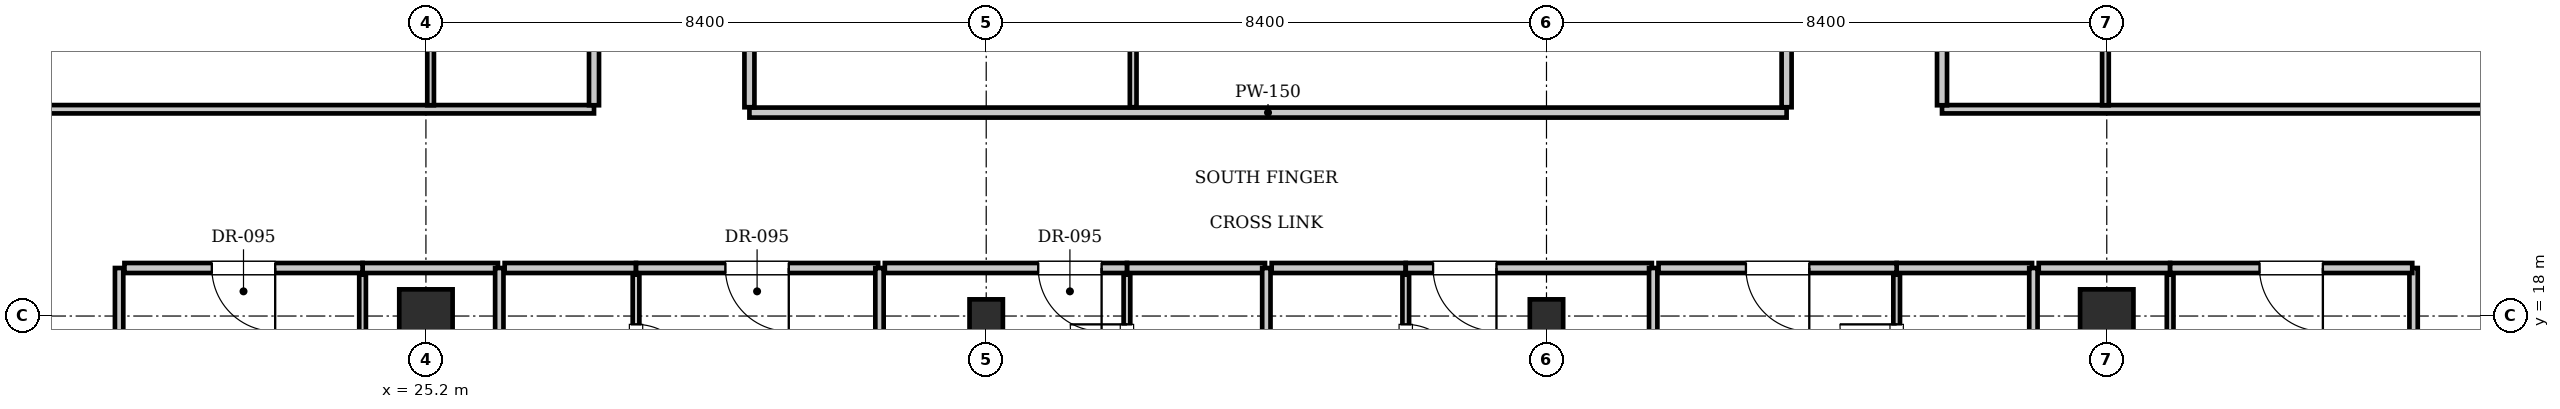
"""IFC4 building model, lengths in metres.
Left out: names, types, materials, properties, quantities, classifications, styles, units other than length and angle.
Written with IfcOpenShell. Run it as: python <this file> out.ifc"""

import sys

from ifc_helpers import new_model, si_unit, direction, frame, frame_2d, origin, origin_2d, place, context, subcontext, project, spatial, rectangle, i_section, extrude, element, fill, save


model = new_model("IFC4")
c1 = context("Model", 3, precision=1e-05, world=origin(), true_north=direction((0.0, 1.0)))
c2 = subcontext(c1, "Body", "Model", "MODEL_VIEW")
j1 = project(units=[si_unit("LENGTHUNIT", "METRE"), si_unit("PLANEANGLEUNIT", "RADIAN")], contexts=[c1])
p1 = place(None, origin())
s1 = spatial("IfcSite", under=j1, at=p1, CompositionType="ELEMENT")
p2 = place(p1, origin())
s2 = spatial("IfcBuilding", under=s1, at=p2, CompositionType="ELEMENT")
p3 = place(p2, frame((0.0, 0.0, 243.25)))
s3 = spatial("IfcBuildingStorey", under=s2, at=p3, CompositionType="ELEMENT", Elevation=243.25)
for number, where, z_axis, x_axis in (
    (1, (25.2, 18.0, 0.0), (0.0, 0.0, 1.0), (1.0, 0.0, 0.0)),
    (2, (50.4, 18.0, 0.0), (0.0, 0.0, 1.0), (1.0, 0.0, 0.0)),
):
    element("IfcColumn", number, at=place(p3, frame(where, z_axis=z_axis, x_axis=x_axis)), inside=s3, PredefinedType="COLUMN", context=c2, shape_type="SweptSolid", body=[
        extrude(rectangle(XDim=0.8, YDim=0.8, at=origin_2d()), origin(), (0.0, 0.0, 1.0), 3.85),
    ])
for number, where, z_axis, x_axis in (
    (3, (33.6, 18.0, 0.0), (0.0, 0.0, 1.0), (1.0, 0.0, 0.0)),
    (4, (42.0, 18.0, 0.0), (0.0, 0.0, 1.0), (1.0, 0.0, 0.0)),
):
    element("IfcColumn", number, at=place(p3, frame(where, z_axis=z_axis, x_axis=x_axis)), inside=s3, PredefinedType="COLUMN", context=c2, shape_type="SweptSolid", body=[
        extrude(i_section(OverallWidth=0.5, OverallDepth=0.5, WebThickness=0.022, FlangeThickness=0.032, at=origin_2d()), origin(), (0.0, 0.0, 1.0), 3.85),
    ])
p4 = place(p3, frame((30.05, 21.05, 0.0), z_axis=(0.0, 0.0, 1.0), x_axis=(1.0, 0.0, 0.0)))
e5 = element("IfcWall", 5, at=p4, inside=s3, PredefinedType="PARTITIONING", context=c2, shape_type="SweptSolid", body=[
    extrude(rectangle(XDim=15.55, YDim=0.15, at=frame_2d((7.775, 0.0))), origin(), (0.0, 0.0, 1.0), 3.61),
])
for number, where, z_axis, x_axis in (
    (6, (30.05, 21.13, 0.0), (0.0, 0.0, 1.0), (0.0, 1.0, 0.0)),
    (7, (45.6, 21.13, 0.0), (0.0, 0.0, 1.0), (0.0, 1.0, 0.0)),
):
    element("IfcWall", number, at=place(p3, frame(where, z_axis=z_axis, x_axis=x_axis)), inside=s3, PredefinedType="PARTITIONING", context=c2, shape_type="SweptSolid", body=[
        extrude(rectangle(XDim=9.49, YDim=0.15, at=frame_2d((4.745, 0.0))), origin(), (0.0, 0.0, 1.0), 3.61),
    ])
p5 = place(p3, frame((35.803, 21.13, 0.0), z_axis=(0.0, 0.0, 1.0), x_axis=(0.0, 1.0, 0.0)))
e8 = element("IfcWall", 8, at=p5, inside=s3, PredefinedType="PARTITIONING", context=c2, shape_type="SweptSolid", body=[
    extrude(rectangle(XDim=9.49, YDim=0.1, at=frame_2d((4.745, 0.0))), origin(), (0.0, 0.0, 1.0), 3.61),
])
for number, where, z_axis, x_axis in (
    (9, (20.6, 14.4, 0.0), (0.0, 0.0, 1.0), (0.0, 1.0, 0.0)),
    (10, (55.0, 14.4, 0.0), (0.0, 0.0, 1.0), (0.0, 1.0, 0.0)),
):
    element("IfcWall", number, at=place(p3, frame(where, z_axis=z_axis, x_axis=x_axis)), inside=s3, PredefinedType="PARTITIONING", context=c2, shape_type="SweptSolid", body=[
        extrude(rectangle(XDim=4.32, YDim=0.125, at=frame_2d((2.16, 0.0))), origin(), (0.0, 0.0, 1.0), 3.61),
    ])
p6 = place(p3, frame((24.25, 18.72, 0.0), z_axis=(0.0, 0.0, 1.0), x_axis=(1.0, 0.0, 0.0)))
e11 = element("IfcWall", 11, at=p6, inside=s3, PredefinedType="PARTITIONING", context=c2, shape_type="SweptSolid", body=[
    extrude(rectangle(XDim=2.03, YDim=0.15, at=frame_2d((1.015, 0.0))), origin(), (0.0, 0.0, 1.0), 3.61),
])
p7 = place(p3, frame((24.25, 16.28, 0.0), z_axis=(0.0, 0.0, 1.0), x_axis=(0.0, 1.0, 0.0)))
e12 = element("IfcWall", 12, at=p7, inside=s3, PredefinedType="PARTITIONING", context=c2, shape_type="SweptSolid", body=[
    extrude(rectangle(XDim=2.34, YDim=0.1, at=frame_2d((1.17, 0.0))), origin(), (0.0, 0.0, 1.0), 3.61),
])
p8 = place(p7, frame((0.265, 0.0, 0.0)))
e13 = element("IfcOpeningElement", 13, at=p8, cuts=e12, PredefinedType="OPENING", context=c2, shape_type="SweptSolid", body=[
    extrude(rectangle(XDim=0.85, YDim=2.1, at=frame_2d((0.425, 1.05))), frame((0.0, 0.06, 0.0), z_axis=(0.0, -1.0, 0.0), x_axis=(1.0, 0.0, 0.0)), (0.0, 0.0, 1.0), 0.12),
])
p9 = place(p3, frame((20.68, 18.72, 0.0), z_axis=(0.0, 0.0, 1.0), x_axis=(1.0, 0.0, 0.0)))
e14 = element("IfcWall", 14, at=p9, inside=s3, PredefinedType="PARTITIONING", context=c2, shape_type="SweptSolid", body=[
    extrude(rectangle(XDim=3.57, YDim=0.15, at=frame_2d((1.785, 0.0))), origin(), (0.0, 0.0, 1.0), 3.61),
])
p10 = place(p9, frame((1.31, 0.0, 0.0)))
e15 = element("IfcOpeningElement", 15, at=p10, cuts=e14, PredefinedType="OPENING", context=c2, shape_type="SweptSolid", body=[
    extrude(rectangle(XDim=0.95, YDim=2.15, at=frame_2d((0.475, 1.075))), frame((0.0, 0.085, 0.0), z_axis=(0.0, -1.0, 0.0), x_axis=(1.0, 0.0, 0.0)), (0.0, 0.0, 1.0), 0.17),
])
p11 = place(p3, frame((26.3, 9.3, 0.0), z_axis=(0.0, 0.0, 1.0), x_axis=(0.0, 1.0, 0.0)))
e16 = element("IfcWall", 16, at=p11, inside=s3, PredefinedType="PARTITIONING", context=c2, shape_type="SweptSolid", body=[
    extrude(rectangle(XDim=9.42, YDim=0.125, at=frame_2d((4.71, 0.0))), origin(), (0.0, 0.0, 1.0), 3.61),
])
p12 = place(p3, frame((26.38, 18.72, 0.0), z_axis=(0.0, 0.0, 1.0), x_axis=(1.0, 0.0, 0.0)))
e17 = element("IfcWall", 17, at=p12, inside=s3, PredefinedType="PARTITIONING", context=c2, shape_type="SweptSolid", body=[
    extrude(rectangle(XDim=1.97, YDim=0.15, at=frame_2d((0.985, 0.0))), origin(), (0.0, 0.0, 1.0), 3.61),
])
p13 = place(p3, frame((28.35, 16.28, 0.0), z_axis=(0.0, 0.0, 1.0), x_axis=(0.0, 1.0, 0.0)))
e18 = element("IfcWall", 18, at=p13, inside=s3, PredefinedType="PARTITIONING", context=c2, shape_type="SweptSolid", body=[
    extrude(rectangle(XDim=2.34, YDim=0.1, at=frame_2d((1.17, 0.0))), origin(), (0.0, 0.0, 1.0), 3.61),
])
p14 = place(p13, frame((0.745, 0.0, 0.0)))
e19 = element("IfcOpeningElement", 19, at=p14, cuts=e18, PredefinedType="OPENING", context=c2, shape_type="SweptSolid", body=[
    extrude(rectangle(XDim=0.85, YDim=2.1, at=frame_2d((0.425, 1.05))), frame((0.0, 0.06, 0.0), z_axis=(0.0, -1.0, 0.0), x_axis=(1.0, 0.0, 0.0)), (0.0, 0.0, 1.0), 0.12),
])
p15 = place(p3, frame((28.35, 18.72, 0.0), z_axis=(0.0, 0.0, 1.0), x_axis=(1.0, 0.0, 0.0)))
e20 = element("IfcWall", 20, at=p15, inside=s3, PredefinedType="PARTITIONING", context=c2, shape_type="SweptSolid", body=[
    extrude(rectangle(XDim=3.63, YDim=0.15, at=frame_2d((1.815, 0.0))), origin(), (0.0, 0.0, 1.0), 3.61),
])
p16 = place(p15, frame((1.34, 0.0, 0.0)))
e21 = element("IfcOpeningElement", 21, at=p16, cuts=e20, PredefinedType="OPENING", context=c2, shape_type="SweptSolid", body=[
    extrude(rectangle(XDim=0.95, YDim=2.15, at=frame_2d((0.475, 1.075))), frame((0.0, 0.085, 0.0), z_axis=(0.0, -1.0, 0.0), x_axis=(1.0, 0.0, 0.0)), (0.0, 0.0, 1.0), 0.17),
])
p17 = place(p3, frame((32.0, 9.3, 0.0), z_axis=(0.0, 0.0, 1.0), x_axis=(0.0, 1.0, 0.0)))
e22 = element("IfcWall", 22, at=p17, inside=s3, PredefinedType="PARTITIONING", context=c2, shape_type="SweptSolid", body=[
    extrude(rectangle(XDim=9.42, YDim=0.125, at=frame_2d((4.71, 0.0))), origin(), (0.0, 0.0, 1.0), 3.61),
])
p18 = place(p3, frame((35.71, 18.72, 0.0), z_axis=(0.0, 0.0, 1.0), x_axis=(1.0, 0.0, 0.0)))
e23 = element("IfcWall", 23, at=p18, inside=s3, PredefinedType="PARTITIONING", context=c2, shape_type="SweptSolid", body=[
    extrude(rectangle(XDim=2.07, YDim=0.15, at=frame_2d((1.035, 0.0))), origin(), (0.0, 0.0, 1.0), 3.61),
])
p19 = place(p3, frame((35.71, 16.28, 0.0), z_axis=(0.0, 0.0, 1.0), x_axis=(0.0, 1.0, 0.0)))
e24 = element("IfcWall", 24, at=p19, inside=s3, PredefinedType="PARTITIONING", context=c2, shape_type="SweptSolid", body=[
    extrude(rectangle(XDim=2.34, YDim=0.1, at=frame_2d((1.17, 0.0))), origin(), (0.0, 0.0, 1.0), 3.61),
])
p20 = place(p19, frame((0.745, 0.0, 0.0)))
e25 = element("IfcOpeningElement", 25, at=p20, cuts=e24, PredefinedType="OPENING", context=c2, shape_type="SweptSolid", body=[
    extrude(rectangle(XDim=0.85, YDim=2.1, at=frame_2d((0.425, 1.05))), frame((0.0, 0.06, 0.0), z_axis=(0.0, -1.0, 0.0), x_axis=(1.0, 0.0, 0.0)), (0.0, 0.0, 1.0), 0.12),
])
p21 = place(p3, frame((32.08, 18.72, 0.0), z_axis=(0.0, 0.0, 1.0), x_axis=(1.0, 0.0, 0.0)))
e26 = element("IfcWall", 26, at=p21, inside=s3, PredefinedType="PARTITIONING", context=c2, shape_type="SweptSolid", body=[
    extrude(rectangle(XDim=3.63, YDim=0.15, at=frame_2d((1.815, 0.0))), origin(), (0.0, 0.0, 1.0), 3.61),
])
p22 = place(p21, frame((2.3, 0.0, 0.0)))
e27 = element("IfcOpeningElement", 27, at=p22, cuts=e26, PredefinedType="OPENING", context=c2, shape_type="SweptSolid", body=[
    extrude(rectangle(XDim=0.95, YDim=2.15, at=frame_2d((0.475, 1.075))), frame((0.0, 0.085, 0.0), z_axis=(0.0, -1.0, 0.0), x_axis=(1.0, 0.0, 0.0)), (0.0, 0.0, 1.0), 0.17),
])
p23 = place(p3, frame((37.8, 9.3, 0.0), z_axis=(0.0, 0.0, 1.0), x_axis=(0.0, 1.0, 0.0)))
e28 = element("IfcWall", 28, at=p23, inside=s3, PredefinedType="PARTITIONING", context=c2, shape_type="SweptSolid", body=[
    extrude(rectangle(XDim=9.42, YDim=0.125, at=frame_2d((4.71, 0.0))), origin(), (0.0, 0.0, 1.0), 3.3),
])
p24 = place(p3, frame((37.88, 18.72, 0.0), z_axis=(0.0, 0.0, 1.0), x_axis=(1.0, 0.0, 0.0)))
e29 = element("IfcWall", 29, at=p24, inside=s3, PredefinedType="PARTITIONING", context=c2, shape_type="SweptSolid", body=[
    extrude(rectangle(XDim=2.01, YDim=0.15, at=frame_2d((1.005, 0.0))), origin(), (0.0, 0.0, 1.0), 3.61),
])
p25 = place(p3, frame((39.89, 16.28, 0.0), z_axis=(0.0, 0.0, 1.0), x_axis=(0.0, 1.0, 0.0)))
e30 = element("IfcWall", 30, at=p25, inside=s3, PredefinedType="PARTITIONING", context=c2, shape_type="SweptSolid", body=[
    extrude(rectangle(XDim=2.34, YDim=0.1, at=frame_2d((1.17, 0.0))), origin(), (0.0, 0.0, 1.0), 3.61),
])
p26 = place(p25, frame((0.745, 0.0, 0.0)))
e31 = element("IfcOpeningElement", 31, at=p26, cuts=e30, PredefinedType="OPENING", context=c2, shape_type="SweptSolid", body=[
    extrude(rectangle(XDim=0.85, YDim=2.1, at=frame_2d((0.425, 1.05))), frame((0.0, 0.06, 0.0), z_axis=(0.0, -1.0, 0.0), x_axis=(1.0, 0.0, 0.0)), (0.0, 0.0, 1.0), 0.12),
])
p27 = place(p3, frame((39.89, 18.72, 0.0), z_axis=(0.0, 0.0, 1.0), x_axis=(1.0, 0.0, 0.0)))
e32 = element("IfcWall", 32, at=p27, inside=s3, PredefinedType="PARTITIONING", context=c2, shape_type="SweptSolid", body=[
    extrude(rectangle(XDim=3.69, YDim=0.15, at=frame_2d((1.845, 0.0))), origin(), (0.0, 0.0, 1.0), 3.61),
])
p28 = place(p27, frame((0.41, 0.0, 0.0)))
e33 = element("IfcOpeningElement", 33, at=p28, cuts=e32, PredefinedType="OPENING", context=c2, shape_type="SweptSolid", body=[
    extrude(rectangle(XDim=0.95, YDim=2.15, at=frame_2d((0.475, 1.075))), frame((0.0, 0.085, 0.0), z_axis=(0.0, -1.0, 0.0), x_axis=(1.0, 0.0, 0.0)), (0.0, 0.0, 1.0), 0.17),
])
p29 = place(p3, frame((43.6, 9.3, 0.0), z_axis=(0.0, 0.0, 1.0), x_axis=(0.0, 1.0, 0.0)))
e34 = element("IfcWall", 34, at=p29, inside=s3, PredefinedType="PARTITIONING", context=c2, shape_type="SweptSolid", body=[
    extrude(rectangle(XDim=9.42, YDim=0.125, at=frame_2d((4.71, 0.0))), origin(), (0.0, 0.0, 1.0), 3.61),
])
p30 = place(p3, frame((47.25, 18.72, 0.0), z_axis=(0.0, 0.0, 1.0), x_axis=(1.0, 0.0, 0.0)))
e35 = element("IfcWall", 35, at=p30, inside=s3, PredefinedType="PARTITIONING", context=c2, shape_type="SweptSolid", body=[
    extrude(rectangle(XDim=2.03, YDim=0.15, at=frame_2d((1.015, 0.0))), origin(), (0.0, 0.0, 1.0), 3.61),
])
p31 = place(p3, frame((47.25, 16.28, 0.0), z_axis=(0.0, 0.0, 1.0), x_axis=(0.0, 1.0, 0.0)))
e36 = element("IfcWall", 36, at=p31, inside=s3, PredefinedType="PARTITIONING", context=c2, shape_type="SweptSolid", body=[
    extrude(rectangle(XDim=2.34, YDim=0.1, at=frame_2d((1.17, 0.0))), origin(), (0.0, 0.0, 1.0), 3.61),
])
p32 = place(p31, frame((0.745, 0.0, 0.0)))
e37 = element("IfcOpeningElement", 37, at=p32, cuts=e36, PredefinedType="OPENING", context=c2, shape_type="SweptSolid", body=[
    extrude(rectangle(XDim=0.85, YDim=2.1, at=frame_2d((0.425, 1.05))), frame((0.0, 0.06, 0.0), z_axis=(0.0, -1.0, 0.0), x_axis=(1.0, 0.0, 0.0)), (0.0, 0.0, 1.0), 0.12),
])
p33 = place(p3, frame((43.68, 18.72, 0.0), z_axis=(0.0, 0.0, 1.0), x_axis=(1.0, 0.0, 0.0)))
e38 = element("IfcWall", 38, at=p33, inside=s3, PredefinedType="PARTITIONING", context=c2, shape_type="SweptSolid", body=[
    extrude(rectangle(XDim=3.57, YDim=0.15, at=frame_2d((1.785, 0.0))), origin(), (0.0, 0.0, 1.0), 3.61),
])
p34 = place(p33, frame((1.31, 0.0, 0.0)))
e39 = element("IfcOpeningElement", 39, at=p34, cuts=e38, PredefinedType="OPENING", context=c2, shape_type="SweptSolid", body=[
    extrude(rectangle(XDim=0.95, YDim=2.15, at=frame_2d((0.475, 1.075))), frame((0.0, 0.085, 0.0), z_axis=(0.0, -1.0, 0.0), x_axis=(1.0, 0.0, 0.0)), (0.0, 0.0, 1.0), 0.17),
])
p35 = place(p3, frame((49.3, 9.3, 0.0), z_axis=(0.0, 0.0, 1.0), x_axis=(0.0, 1.0, 0.0)))
e40 = element("IfcWall", 40, at=p35, inside=s3, PredefinedType="PARTITIONING", context=c2, shape_type="SweptSolid", body=[
    extrude(rectangle(XDim=9.42, YDim=0.125, at=frame_2d((4.71, 0.0))), origin(), (0.0, 0.0, 1.0), 3.61),
])
p36 = place(p3, frame((49.38, 18.72, 0.0), z_axis=(0.0, 0.0, 1.0), x_axis=(1.0, 0.0, 0.0)))
e41 = element("IfcWall", 41, at=p36, inside=s3, PredefinedType="PARTITIONING", context=c2, shape_type="SweptSolid", body=[
    extrude(rectangle(XDim=1.97, YDim=0.15, at=frame_2d((0.985, 0.0))), origin(), (0.0, 0.0, 1.0), 3.61),
])
p37 = place(p3, frame((51.35, 16.28, 0.0), z_axis=(0.0, 0.0, 1.0), x_axis=(0.0, 1.0, 0.0)))
e42 = element("IfcWall", 42, at=p37, inside=s3, PredefinedType="PARTITIONING", context=c2, shape_type="SweptSolid", body=[
    extrude(rectangle(XDim=2.34, YDim=0.1, at=frame_2d((1.17, 0.0))), origin(), (0.0, 0.0, 1.0), 3.61),
])
p38 = place(p37, frame((0.265, 0.0, 0.0)))
e43 = element("IfcOpeningElement", 43, at=p38, cuts=e42, PredefinedType="OPENING", context=c2, shape_type="SweptSolid", body=[
    extrude(rectangle(XDim=0.85, YDim=2.1, at=frame_2d((0.425, 1.05))), frame((0.0, 0.06, 0.0), z_axis=(0.0, -1.0, 0.0), x_axis=(1.0, 0.0, 0.0)), (0.0, 0.0, 1.0), 0.12),
])
p39 = place(p3, frame((51.35, 18.72, 0.0), z_axis=(0.0, 0.0, 1.0), x_axis=(1.0, 0.0, 0.0)))
e44 = element("IfcWall", 44, at=p39, inside=s3, PredefinedType="PARTITIONING", context=c2, shape_type="SweptSolid", body=[
    extrude(rectangle(XDim=3.63, YDim=0.15, at=frame_2d((1.815, 0.0))), origin(), (0.0, 0.0, 1.0), 3.61),
])
p40 = place(p39, frame((1.34, 0.0, 0.0)))
e45 = element("IfcOpeningElement", 45, at=p40, cuts=e44, PredefinedType="OPENING", context=c2, shape_type="SweptSolid", body=[
    extrude(rectangle(XDim=0.95, YDim=2.15, at=frame_2d((0.475, 1.075))), frame((0.0, 0.085, 0.0), z_axis=(0.0, -1.0, 0.0), x_axis=(1.0, 0.0, 0.0)), (0.0, 0.0, 1.0), 0.17),
])
p41 = place(p3, frame((15.5, 21.1, 0.0), z_axis=(0.0, 0.0, 1.0), x_axis=(1.0, 0.0, 0.0)))
e46 = element("IfcWall", 46, at=p41, inside=s3, PredefinedType="PARTITIONING", context=c2, shape_type="SweptSolid", body=[
    extrude(rectangle(XDim=12.22, YDim=0.125, at=frame_2d((6.11, 0.0))), origin(), (0.0, 0.0, 1.0), 3.61),
])
p42 = place(p3, frame((47.93, 21.1, 0.0), z_axis=(0.0, 0.0, 1.0), x_axis=(1.0, 0.0, 0.0)))
e47 = element("IfcWall", 47, at=p42, inside=s3, PredefinedType="PARTITIONING", context=c2, shape_type="SweptSolid", body=[
    extrude(rectangle(XDim=12.17, YDim=0.125, at=frame_2d((6.085, 0.0))), origin(), (0.0, 0.0, 1.0), 3.61),
])
p43 = place(p3, frame((27.72, 21.16, 0.0), z_axis=(0.0, 0.0, 1.0), x_axis=(0.0, 1.0, 0.0)))
e48 = element("IfcWall", 48, at=p43, inside=s3, PredefinedType="PARTITIONING", context=c2, shape_type="SweptSolid", body=[
    extrude(rectangle(XDim=1.97, YDim=0.15, at=frame_2d((0.985, 0.0))), origin(), (0.0, 0.0, 1.0), 3.61),
])
p44 = place(p3, frame((25.27, 21.16, 0.0), z_axis=(0.0, 0.0, 1.0), x_axis=(0.0, 1.0, 0.0)))
e49 = element("IfcWall", 49, at=p44, inside=s3, PredefinedType="PARTITIONING", context=c2, shape_type="SweptSolid", body=[
    extrude(rectangle(XDim=1.97, YDim=0.1, at=frame_2d((0.985, 0.0))), origin(), (0.0, 0.0, 1.0), 3.077),
])
p45 = place(p3, frame((47.93, 21.16, 0.0), z_axis=(0.0, 0.0, 1.0), x_axis=(0.0, 1.0, 0.0)))
e50 = element("IfcWall", 50, at=p45, inside=s3, PredefinedType="PARTITIONING", context=c2, shape_type="SweptSolid", body=[
    extrude(rectangle(XDim=1.97, YDim=0.15, at=frame_2d((0.985, 0.0))), origin(), (0.0, 0.0, 1.0), 3.61),
])
p46 = place(p3, frame((50.38, 21.16, 0.0), z_axis=(0.0, 0.0, 1.0), x_axis=(0.0, 1.0, 0.0)))
e51 = element("IfcWall", 51, at=p46, inside=s3, PredefinedType="PARTITIONING", context=c2, shape_type="SweptSolid", body=[
    extrude(rectangle(XDim=1.97, YDim=0.1, at=frame_2d((0.985, 0.0))), origin(), (0.0, 0.0, 1.0), 3.077),
])
p47 = place(p10, frame((0.95, 0.0, 0.0), z_axis=(0.0, 0.0, 1.0), x_axis=(-1.0, 0.0, 0.0)))
e52 = element("IfcDoor", 52, at=p47, inside=s3, OperationType="SINGLE_SWING_LEFT", PredefinedType="DOOR", context=c2, shape_type="SweptSolid", body=[
    extrude(rectangle(XDim=0.95, YDim=2.15, at=frame_2d((0.475, 1.075))), frame((0.0, 0.025, 0.0), z_axis=(0.0, -1.0, 0.0), x_axis=(1.0, 0.0, 0.0)), (0.0, 0.0, 1.0), 0.05),
])
fill(e15, e52)
p48 = place(p14, frame((0.85, 0.0, 0.0), z_axis=(0.0, 0.0, 1.0), x_axis=(-1.0, 0.0, 0.0)))
e53 = element("IfcDoor", 53, at=p48, inside=s3, OperationType="SINGLE_SWING_RIGHT", PredefinedType="DOOR", context=c2, shape_type="SweptSolid", body=[
    extrude(rectangle(XDim=0.85, YDim=2.1, at=frame_2d((0.425, 1.05))), frame((0.0, 0.025, 0.0), z_axis=(0.0, -1.0, 0.0), x_axis=(1.0, 0.0, 0.0)), (0.0, 0.0, 1.0), 0.05),
])
fill(e19, e53)
p49 = place(p16, frame((0.95, 0.0, 0.0), z_axis=(0.0, 0.0, 1.0), x_axis=(-1.0, 0.0, 0.0)))
e54 = element("IfcDoor", 54, at=p49, inside=s3, OperationType="SINGLE_SWING_LEFT", PredefinedType="DOOR", context=c2, shape_type="SweptSolid", body=[
    extrude(rectangle(XDim=0.95, YDim=2.15, at=frame_2d((0.475, 1.075))), frame((0.0, 0.025, 0.0), z_axis=(0.0, -1.0, 0.0), x_axis=(1.0, 0.0, 0.0)), (0.0, 0.0, 1.0), 0.05),
])
fill(e21, e54)
p50 = place(p20, origin())
e55 = element("IfcDoor", 55, at=p50, inside=s3, OperationType="SINGLE_SWING_RIGHT", PredefinedType="DOOR", context=c2, shape_type="SweptSolid", body=[
    extrude(rectangle(XDim=0.85, YDim=2.1, at=frame_2d((0.425, 1.05))), frame((0.0, 0.025, 0.0), z_axis=(0.0, -1.0, 0.0), x_axis=(1.0, 0.0, 0.0)), (0.0, 0.0, 1.0), 0.05),
])
fill(e25, e55)
p51 = place(p22, frame((0.95, 0.0, 0.0), z_axis=(0.0, 0.0, 1.0), x_axis=(-1.0, 0.0, 0.0)))
e56 = element("IfcDoor", 56, at=p51, inside=s3, OperationType="SINGLE_SWING_LEFT", PredefinedType="DOOR", context=c2, shape_type="SweptSolid", body=[
    extrude(rectangle(XDim=0.95, YDim=2.15, at=frame_2d((0.475, 1.075))), frame((0.0, 0.025, 0.0), z_axis=(0.0, -1.0, 0.0), x_axis=(1.0, 0.0, 0.0)), (0.0, 0.0, 1.0), 0.05),
])
fill(e27, e56)
p52 = place(p26, frame((0.85, 0.0, 0.0), z_axis=(0.0, 0.0, 1.0), x_axis=(-1.0, 0.0, 0.0)))
e57 = element("IfcDoor", 57, at=p52, inside=s3, OperationType="SINGLE_SWING_RIGHT", PredefinedType="DOOR", context=c2, shape_type="SweptSolid", body=[
    extrude(rectangle(XDim=0.85, YDim=2.1, at=frame_2d((0.425, 1.05))), frame((0.0, 0.025, 0.0), z_axis=(0.0, -1.0, 0.0), x_axis=(1.0, 0.0, 0.0)), (0.0, 0.0, 1.0), 0.05),
])
fill(e31, e57)
p53 = place(p28, frame((0.95, 0.0, 0.0), z_axis=(0.0, 0.0, 1.0), x_axis=(-1.0, 0.0, 0.0)))
e58 = element("IfcDoor", 58, at=p53, inside=s3, OperationType="SINGLE_SWING_LEFT", PredefinedType="DOOR", context=c2, shape_type="SweptSolid", body=[
    extrude(rectangle(XDim=0.95, YDim=2.15, at=frame_2d((0.475, 1.075))), frame((0.0, 0.025, 0.0), z_axis=(0.0, -1.0, 0.0), x_axis=(1.0, 0.0, 0.0)), (0.0, 0.0, 1.0), 0.05),
])
fill(e33, e58)
p54 = place(p32, origin())
e59 = element("IfcDoor", 59, at=p54, inside=s3, OperationType="SINGLE_SWING_RIGHT", PredefinedType="DOOR", context=c2, shape_type="SweptSolid", body=[
    extrude(rectangle(XDim=0.85, YDim=2.1, at=frame_2d((0.425, 1.05))), frame((0.0, 0.025, 0.0), z_axis=(0.0, -1.0, 0.0), x_axis=(1.0, 0.0, 0.0)), (0.0, 0.0, 1.0), 0.05),
])
fill(e37, e59)
p55 = place(p34, frame((0.95, 0.0, 0.0), z_axis=(0.0, 0.0, 1.0), x_axis=(-1.0, 0.0, 0.0)))
e60 = element("IfcDoor", 60, at=p55, inside=s3, OperationType="SINGLE_SWING_LEFT", PredefinedType="DOOR", context=c2, shape_type="SweptSolid", body=[
    extrude(rectangle(XDim=0.95, YDim=2.15, at=frame_2d((0.475, 1.075))), frame((0.0, 0.025, 0.0), z_axis=(0.0, -1.0, 0.0), x_axis=(1.0, 0.0, 0.0)), (0.0, 0.0, 1.0), 0.05),
])
fill(e39, e60)
p56 = place(p40, frame((0.95, 0.0, 0.0), z_axis=(0.0, 0.0, 1.0), x_axis=(-1.0, 0.0, 0.0)))
e61 = element("IfcDoor", 61, at=p56, inside=s3, OperationType="SINGLE_SWING_LEFT", PredefinedType="DOOR", context=c2, shape_type="SweptSolid", body=[
    extrude(rectangle(XDim=0.95, YDim=2.15, at=frame_2d((0.475, 1.075))), frame((0.0, 0.025, 0.0), z_axis=(0.0, -1.0, 0.0), x_axis=(1.0, 0.0, 0.0)), (0.0, 0.0, 1.0), 0.05),
])
fill(e45, e61)
save(model, sys.argv[1])
